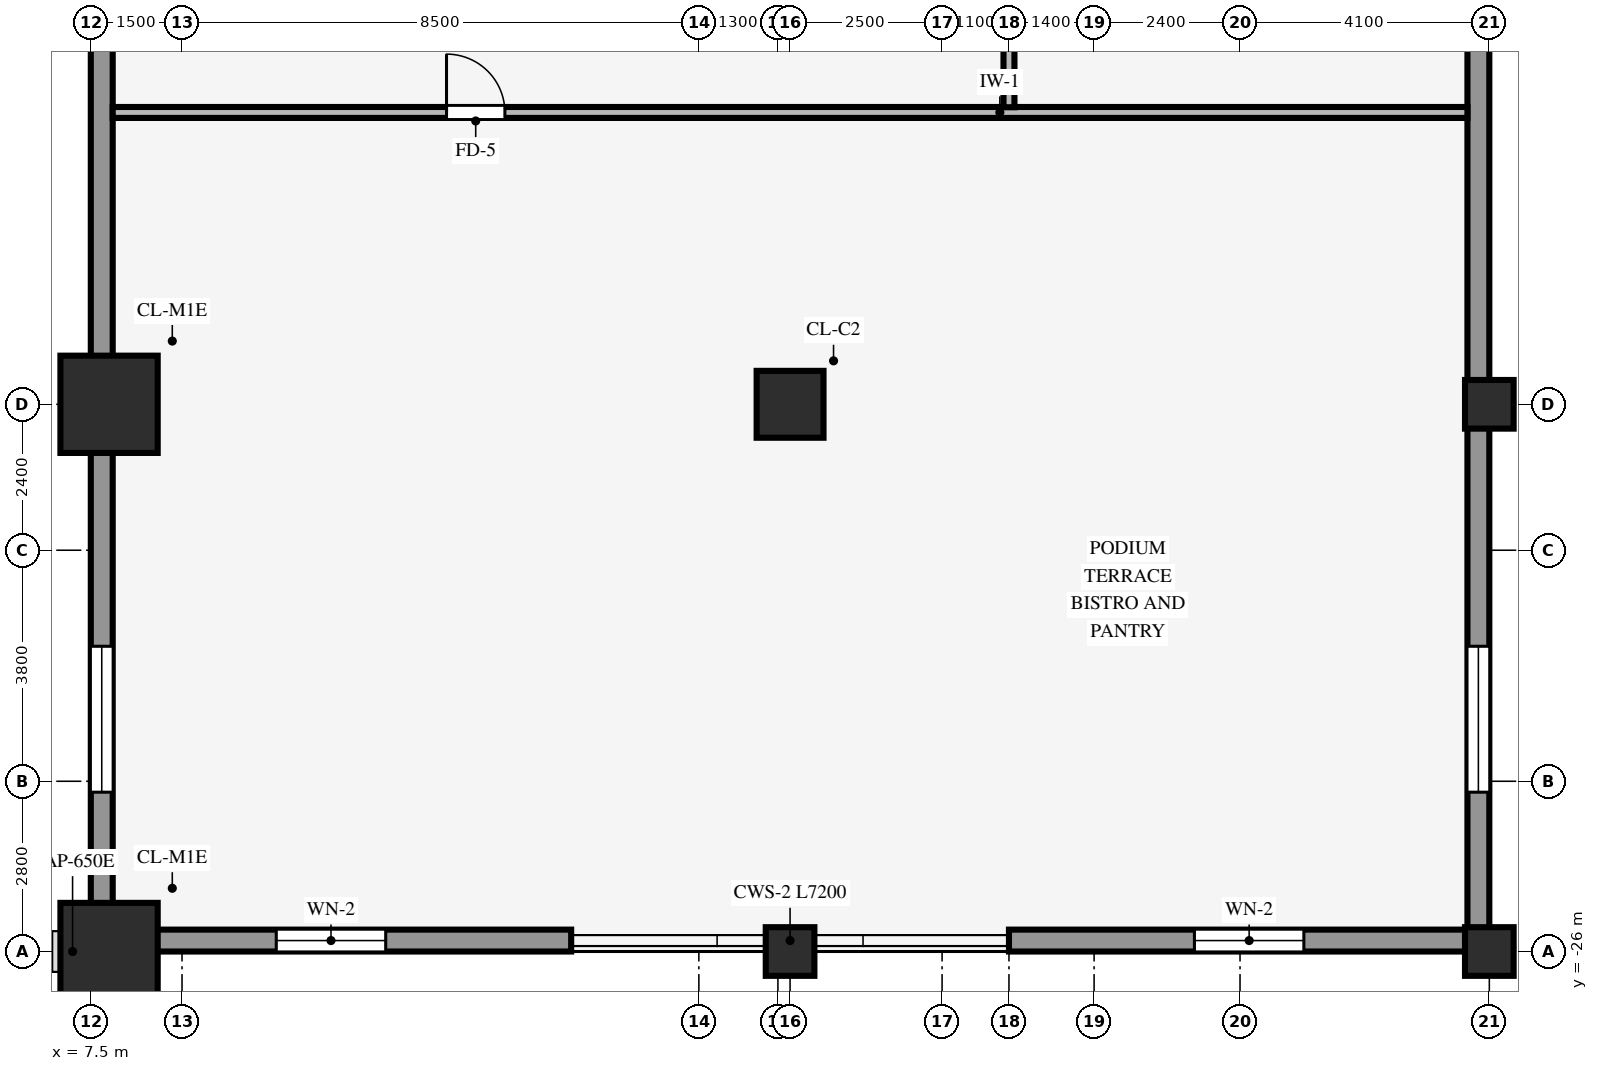
"""IFC4 building model, lengths in metres.
Left out: names, types, materials, properties, quantities, classifications, styles, units other than length and angle.
Written with IfcOpenShell. Run it as: python <this file> out.ifc"""

import sys

from ifc_helpers import new_model, si_unit, direction, frame, frame_2d, origin, origin_2d, place, context, subcontext, project, spatial, rectangle, hollow_rectangle, extrude, source, transform, mapped, element, fill, save


model = new_model("IFC4")
c1 = context("Model", 3, precision=1e-05, world=origin(), true_north=direction((0.0, 1.0)))
c2 = subcontext(c1, "Body", "Model", "MODEL_VIEW")
j1 = project(units=[si_unit("LENGTHUNIT", "METRE"), si_unit("PLANEANGLEUNIT", "RADIAN")], contexts=[c1])
p1 = place(None, origin())
s1 = spatial("IfcSite", under=j1, at=p1, CompositionType="ELEMENT")
p2 = place(p1, origin())
s2 = spatial("IfcBuilding", under=s1, at=p2, CompositionType="ELEMENT")
p3 = place(p2, frame((0.0, 0.0, 4.6)))
s3 = spatial("IfcBuildingStorey", under=s2, at=p3, CompositionType="ELEMENT", Elevation=4.6)
for number, where, z_axis, x_axis in (
    (1, (7.8, -26.0, 0.0), (0.0, 0.0, 1.0), (1.0, 0.0, 0.0)),
    (2, (7.8, -17.0, 0.0), (0.0, 0.0, 1.0), (1.0, 0.0, 0.0)),
):
    element("IfcColumn", number, at=place(p3, frame(where, z_axis=z_axis, x_axis=x_axis)), inside=s3, PredefinedType="COLUMN", context=c2, shape_type="SweptSolid", body=[
        extrude(rectangle(XDim=1.6, YDim=1.6, at=origin_2d()), origin(), (0.0, 0.0, 1.0), 4.28),
    ])
p4 = place(p3, frame((19.0, -26.0, 0.0), z_axis=(0.0, 0.0, 1.0), x_axis=(1.0, 0.0, 0.0)))
e3 = element("IfcColumn", 3, at=p4, inside=s3, PredefinedType="COLUMN", context=c2, shape_type="SweptSolid", body=[
    extrude(hollow_rectangle(XDim=0.8, YDim=0.8, WallThickness=0.055, InnerFilletRadius=0.055, OuterFilletRadius=0.11, at=origin_2d()), origin(), (0.0, 0.0, 1.0), 4.28),
])
p5 = place(p3, frame((19.0, -17.0, 0.0), z_axis=(0.0, 0.0, 1.0), x_axis=(1.0, 0.0, 0.0)))
e4 = element("IfcColumn", 4, at=p5, inside=s3, PredefinedType="COLUMN", context=c2, shape_type="SweptSolid", body=[
    extrude(rectangle(XDim=1.1, YDim=1.1, at=origin_2d()), origin(), (0.0, 0.0, 1.0), 4.28),
])
for number, where, z_axis, x_axis in (
    (5, (30.5, -26.0, 0.0), (0.0, 0.0, 1.0), (1.0, 0.0, 0.0)),
    (6, (30.5, -17.0, 0.0), (0.0, 0.0, 1.0), (1.0, 0.0, 0.0)),
):
    element("IfcColumn", number, at=place(p3, frame(where, z_axis=z_axis, x_axis=x_axis)), inside=s3, PredefinedType="COLUMN", context=c2, shape_type="SweptSolid", body=[
        extrude(hollow_rectangle(XDim=0.8, YDim=0.8, WallThickness=0.055, InnerFilletRadius=0.055, OuterFilletRadius=0.11, at=origin_2d()), origin(), (0.0, 0.0, 1.0), 4.28),
    ])
p6 = place(p3, frame((7.5, -25.82, 0.0), z_axis=(0.0, 0.0, 1.0), x_axis=(1.0, 0.0, 0.0)))
e7 = element("IfcWall", 7, at=p6, inside=s3, PredefinedType="STANDARD", context=c2, shape_type="SweptSolid", body=[
    extrude(rectangle(XDim=7.9, YDim=0.36, at=frame_2d((3.95, 0.0))), origin(), (0.0, 0.0, 1.0), 3.615),
])
p7 = place(p6, frame((3.05, 0.0, 0.85)))
e8 = element("IfcOpeningElement", 8, at=p7, cuts=e7, PredefinedType="OPENING", context=c2, shape_type="SweptSolid", body=[
    extrude(rectangle(XDim=1.8, YDim=2.35, at=frame_2d((0.9, 1.175))), frame((0.0, 0.19, 0.0), z_axis=(0.0, -1.0, 0.0), x_axis=(1.0, 0.0, 0.0)), (0.0, 0.0, 1.0), 0.38),
])
p8 = place(p3, frame((22.6, -25.82, 0.0), z_axis=(0.0, 0.0, 1.0), x_axis=(1.0, 0.0, 0.0)))
e9 = element("IfcWall", 9, at=p8, inside=s3, PredefinedType="STANDARD", context=c2, shape_type="SweptSolid", body=[
    extrude(rectangle(XDim=7.9, YDim=0.36, at=frame_2d((3.95, 0.0))), origin(), (0.0, 0.0, 1.0), 3.615),
])
p9 = place(p8, frame((3.05, 0.0, 0.85)))
e10 = element("IfcOpeningElement", 10, at=p9, cuts=e9, PredefinedType="OPENING", context=c2, shape_type="SweptSolid", body=[
    extrude(rectangle(XDim=1.8, YDim=2.35, at=frame_2d((0.9, 1.175))), frame((0.0, 0.19, 0.0), z_axis=(0.0, -1.0, 0.0), x_axis=(1.0, 0.0, 0.0)), (0.0, 0.0, 1.0), 0.38),
])
p10 = place(p3, frame((30.32, -25.644, 0.0), z_axis=(0.0, 0.0, 1.0), x_axis=(0.0, 1.0, 0.0)))
e11 = element("IfcWall", 11, at=p10, inside=s3, PredefinedType="STANDARD", context=c2, shape_type="SweptSolid", body=[
    extrude(rectangle(XDim=51.288, YDim=0.36, at=frame_2d((25.644, 0.0))), origin(), (0.0, 0.0, 1.0), 3.615),
])
p11 = place(p10, frame((2.264, 0.0, 0.85)))
e12 = element("IfcOpeningElement", 12, at=p11, cuts=e11, PredefinedType="OPENING", context=c2, shape_type="SweptSolid", body=[
    extrude(rectangle(XDim=2.4, YDim=2.45, at=frame_2d((1.2, 1.225))), frame((0.0, 0.19, 0.0), z_axis=(0.0, -1.0, 0.0), x_axis=(1.0, 0.0, 0.0)), (0.0, 0.0, 1.0), 0.38),
])
p12 = place(p10, frame((17.051, 0.0, 0.85)))
e13 = element("IfcOpeningElement", 13, at=p12, cuts=e11, PredefinedType="OPENING", context=c2, shape_type="SweptSolid", body=[
    extrude(rectangle(XDim=2.4, YDim=2.45, at=frame_2d((1.2, 1.225))), frame((0.0, 0.19, 0.0), z_axis=(0.0, -1.0, 0.0), x_axis=(1.0, 0.0, 0.0)), (0.0, 0.0, 1.0), 0.38),
])
p13 = place(p10, frame((21.979, 0.0, 0.85)))
e14 = element("IfcOpeningElement", 14, at=p13, cuts=e11, PredefinedType="OPENING", context=c2, shape_type="SweptSolid", body=[
    extrude(rectangle(XDim=2.4, YDim=2.45, at=frame_2d((1.2, 1.225))), frame((0.0, 0.19, 0.0), z_axis=(0.0, -1.0, 0.0), x_axis=(1.0, 0.0, 0.0)), (0.0, 0.0, 1.0), 0.38),
])
p14 = place(p10, frame((26.908, 0.0, 0.85)))
e15 = element("IfcOpeningElement", 15, at=p14, cuts=e11, PredefinedType="OPENING", context=c2, shape_type="SweptSolid", body=[
    extrude(rectangle(XDim=2.4, YDim=2.45, at=frame_2d((1.2, 1.225))), frame((0.0, 0.19, 0.0), z_axis=(0.0, -1.0, 0.0), x_axis=(1.0, 0.0, 0.0)), (0.0, 0.0, 1.0), 0.38),
])
p15 = place(p10, frame((31.837, 0.0, 0.85)))
e16 = element("IfcOpeningElement", 16, at=p15, cuts=e11, PredefinedType="OPENING", context=c2, shape_type="SweptSolid", body=[
    extrude(rectangle(XDim=2.4, YDim=2.45, at=frame_2d((1.2, 1.225))), frame((0.0, 0.19, 0.0), z_axis=(0.0, -1.0, 0.0), x_axis=(1.0, 0.0, 0.0)), (0.0, 0.0, 1.0), 0.38),
])
p16 = place(p10, frame((46.624, 0.0, 0.85)))
e17 = element("IfcOpeningElement", 17, at=p16, cuts=e11, PredefinedType="OPENING", context=c2, shape_type="SweptSolid", body=[
    extrude(rectangle(XDim=2.4, YDim=2.45, at=frame_2d((1.2, 1.225))), frame((0.0, 0.19, 0.0), z_axis=(0.0, -1.0, 0.0), x_axis=(1.0, 0.0, 0.0)), (0.0, 0.0, 1.0), 0.38),
])
p17 = place(p3, frame((7.68, -25.644, 0.0), z_axis=(0.0, 0.0, 1.0), x_axis=(0.0, 1.0, 0.0)))
e18 = element("IfcWall", 18, at=p17, inside=s3, PredefinedType="STANDARD", context=c2, shape_type="SweptSolid", body=[
    extrude(rectangle(XDim=51.288, YDim=0.36, at=frame_2d((25.644, 0.0))), origin(), (0.0, 0.0, 1.0), 3.649),
])
p18 = place(p17, frame((2.264, 0.0, 0.85)))
e19 = element("IfcOpeningElement", 19, at=p18, cuts=e18, PredefinedType="OPENING", context=c2, shape_type="SweptSolid", body=[
    extrude(rectangle(XDim=2.4, YDim=2.45, at=frame_2d((1.2, 1.225))), frame((0.0, 0.19, 0.0), z_axis=(0.0, -1.0, 0.0), x_axis=(1.0, 0.0, 0.0)), (0.0, 0.0, 1.0), 0.38),
])
p19 = place(p17, frame((17.051, 0.0, 0.85)))
e20 = element("IfcOpeningElement", 20, at=p19, cuts=e18, PredefinedType="OPENING", context=c2, shape_type="SweptSolid", body=[
    extrude(rectangle(XDim=2.4, YDim=2.45, at=frame_2d((1.2, 1.225))), frame((0.0, 0.19, 0.0), z_axis=(0.0, -1.0, 0.0), x_axis=(1.0, 0.0, 0.0)), (0.0, 0.0, 1.0), 0.38),
])
p20 = place(p17, frame((21.979, 0.0, 0.85)))
e21 = element("IfcOpeningElement", 21, at=p20, cuts=e18, PredefinedType="OPENING", context=c2, shape_type="SweptSolid", body=[
    extrude(rectangle(XDim=2.4, YDim=2.45, at=frame_2d((1.2, 1.225))), frame((0.0, 0.19, 0.0), z_axis=(0.0, -1.0, 0.0), x_axis=(1.0, 0.0, 0.0)), (0.0, 0.0, 1.0), 0.38),
])
p21 = place(p17, frame((26.908, 0.0, 0.85)))
e22 = element("IfcOpeningElement", 22, at=p21, cuts=e18, PredefinedType="OPENING", context=c2, shape_type="SweptSolid", body=[
    extrude(rectangle(XDim=2.4, YDim=2.45, at=frame_2d((1.2, 1.225))), frame((0.0, 0.19, 0.0), z_axis=(0.0, -1.0, 0.0), x_axis=(1.0, 0.0, 0.0)), (0.0, 0.0, 1.0), 0.38),
])
p22 = place(p17, frame((31.837, 0.0, 0.85)))
e23 = element("IfcOpeningElement", 23, at=p22, cuts=e18, PredefinedType="OPENING", context=c2, shape_type="SweptSolid", body=[
    extrude(rectangle(XDim=2.4, YDim=2.45, at=frame_2d((1.2, 1.225))), frame((0.0, 0.19, 0.0), z_axis=(0.0, -1.0, 0.0), x_axis=(1.0, 0.0, 0.0)), (0.0, 0.0, 1.0), 0.38),
])
p23 = place(p17, frame((46.624, 0.0, 0.85)))
e24 = element("IfcOpeningElement", 24, at=p23, cuts=e18, PredefinedType="OPENING", context=c2, shape_type="SweptSolid", body=[
    extrude(rectangle(XDim=2.4, YDim=2.45, at=frame_2d((1.2, 1.225))), frame((0.0, 0.19, 0.0), z_axis=(0.0, -1.0, 0.0), x_axis=(1.0, 0.0, 0.0)), (0.0, 0.0, 1.0), 0.38),
])
p24 = place(p3, frame((7.86, -12.2, 0.0), z_axis=(0.0, 0.0, 1.0), x_axis=(1.0, 0.0, 0.0)))
e25 = element("IfcWall", 25, at=p24, inside=s3, PredefinedType="PARTITIONING", context=c2, shape_type="SweptSolid", body=[
    extrude(rectangle(XDim=22.28, YDim=0.18, at=frame_2d((11.14, 0.0))), origin(), (0.0, 0.0, 1.0), 4.27),
])
p25 = place(p24, frame((5.49, 0.0, 0.0)))
e26 = element("IfcOpeningElement", 26, at=p25, cuts=e25, PredefinedType="OPENING", context=c2, shape_type="SweptSolid", body=[
    extrude(rectangle(XDim=0.96, YDim=2.1, at=frame_2d((0.48, 1.05))), frame((0.0, 0.1, 0.0), z_axis=(0.0, -1.0, 0.0), x_axis=(1.0, 0.0, 0.0)), (0.0, 0.0, 1.0), 0.2),
])
p26 = place(p3, frame((22.6, -12.114, 0.0), z_axis=(0.0, 0.0, 1.0), x_axis=(0.0, 1.0, 0.0)))
e27 = element("IfcWall", 27, at=p26, inside=s3, PredefinedType="PARTITIONING", context=c2, shape_type="SweptSolid", body=[
    extrude(rectangle(XDim=37.919, YDim=0.18, at=frame_2d((18.959, 0.0))), origin(), (0.0, 0.0, 1.0), 4.27),
])
p27 = place(p26, frame((11.634, 0.0, 0.0)))
e28 = element("IfcOpeningElement", 28, at=p27, cuts=e27, PredefinedType="OPENING", context=c2, shape_type="SweptSolid", body=[
    extrude(rectangle(XDim=0.96, YDim=2.1, at=frame_2d((0.48, 1.05))), frame((0.0, 0.1, 0.0), z_axis=(0.0, -1.0, 0.0), x_axis=(1.0, 0.0, 0.0)), (0.0, 0.0, 1.0), 0.2),
])
p28 = place(p26, frame((29.534, 0.0, 0.0)))
e29 = element("IfcOpeningElement", 29, at=p28, cuts=e27, PredefinedType="OPENING", context=c2, shape_type="SweptSolid", body=[
    extrude(rectangle(XDim=0.96, YDim=2.1, at=frame_2d((0.48, 1.05))), frame((0.0, 0.1, 0.0), z_axis=(0.0, -1.0, 0.0), x_axis=(1.0, 0.0, 0.0)), (0.0, 0.0, 1.0), 0.2),
])
m1 = source(origin(), c2, "Body", "SweptSolid", [
    extrude(rectangle(XDim=1.8, YDim=2.35, at=frame_2d((0.9, 1.175))), frame((0.0, 0.03, 0.0), z_axis=(0.0, -1.0, 0.0), x_axis=(1.0, 0.0, 0.0)), (0.0, 0.0, 1.0), 0.06),
])
p29 = place(p7, origin())
e30 = element("IfcWindow", 30, at=p29, inside=s3, PartitioningType="SINGLE_PANEL", PredefinedType="WINDOW", context=c2, shape_type="MappedRepresentation", body=[
    mapped(m1, transform((0.0, 0.0, 0.0), scale=1.0)),
])
fill(e8, e30)
p30 = place(p9, origin())
e31 = element("IfcWindow", 31, at=p30, inside=s3, PartitioningType="SINGLE_PANEL", PredefinedType="WINDOW", context=c2, shape_type="MappedRepresentation", body=[
    mapped(m1, transform((0.0, 0.0, 0.0), scale=1.0)),
])
fill(e10, e31)
m2 = source(origin(), c2, "Body", "SweptSolid", [
    extrude(rectangle(XDim=2.4, YDim=2.45, at=frame_2d((1.2, 1.225))), frame((0.0, 0.03, 0.0), z_axis=(0.0, -1.0, 0.0), x_axis=(1.0, 0.0, 0.0)), (0.0, 0.0, 1.0), 0.06),
])
p31 = place(p11, origin())
e32 = element("IfcWindow", 32, at=p31, inside=s3, PartitioningType="SINGLE_PANEL", PredefinedType="WINDOW", context=c2, shape_type="MappedRepresentation", body=[
    mapped(m2, transform((0.0, 0.0, 0.0), scale=1.0)),
])
fill(e12, e32)
p32 = place(p18, origin())
e33 = element("IfcWindow", 33, at=p32, inside=s3, PartitioningType="SINGLE_PANEL", PredefinedType="WINDOW", context=c2, shape_type="MappedRepresentation", body=[
    mapped(m2, transform((0.0, 0.0, 0.0), scale=1.0)),
])
fill(e19, e33)
m3 = source(origin(), c2, "Body", "SweptSolid", [
    extrude(rectangle(XDim=0.96, YDim=2.1, at=frame_2d((0.48, 1.05))), frame((0.0, 0.025, 0.0), z_axis=(0.0, -1.0, 0.0), x_axis=(1.0, 0.0, 0.0)), (0.0, 0.0, 1.0), 0.05),
])
p33 = place(p25, origin())
e34 = element("IfcDoor", 34, at=p33, inside=s3, OperationType="SINGLE_SWING_LEFT", PredefinedType="DOOR", context=c2, shape_type="MappedRepresentation", body=[
    mapped(m3, transform((0.0, 0.0, 0.0), scale=1.0)),
])
fill(e26, e34)
save(model, sys.argv[1])
